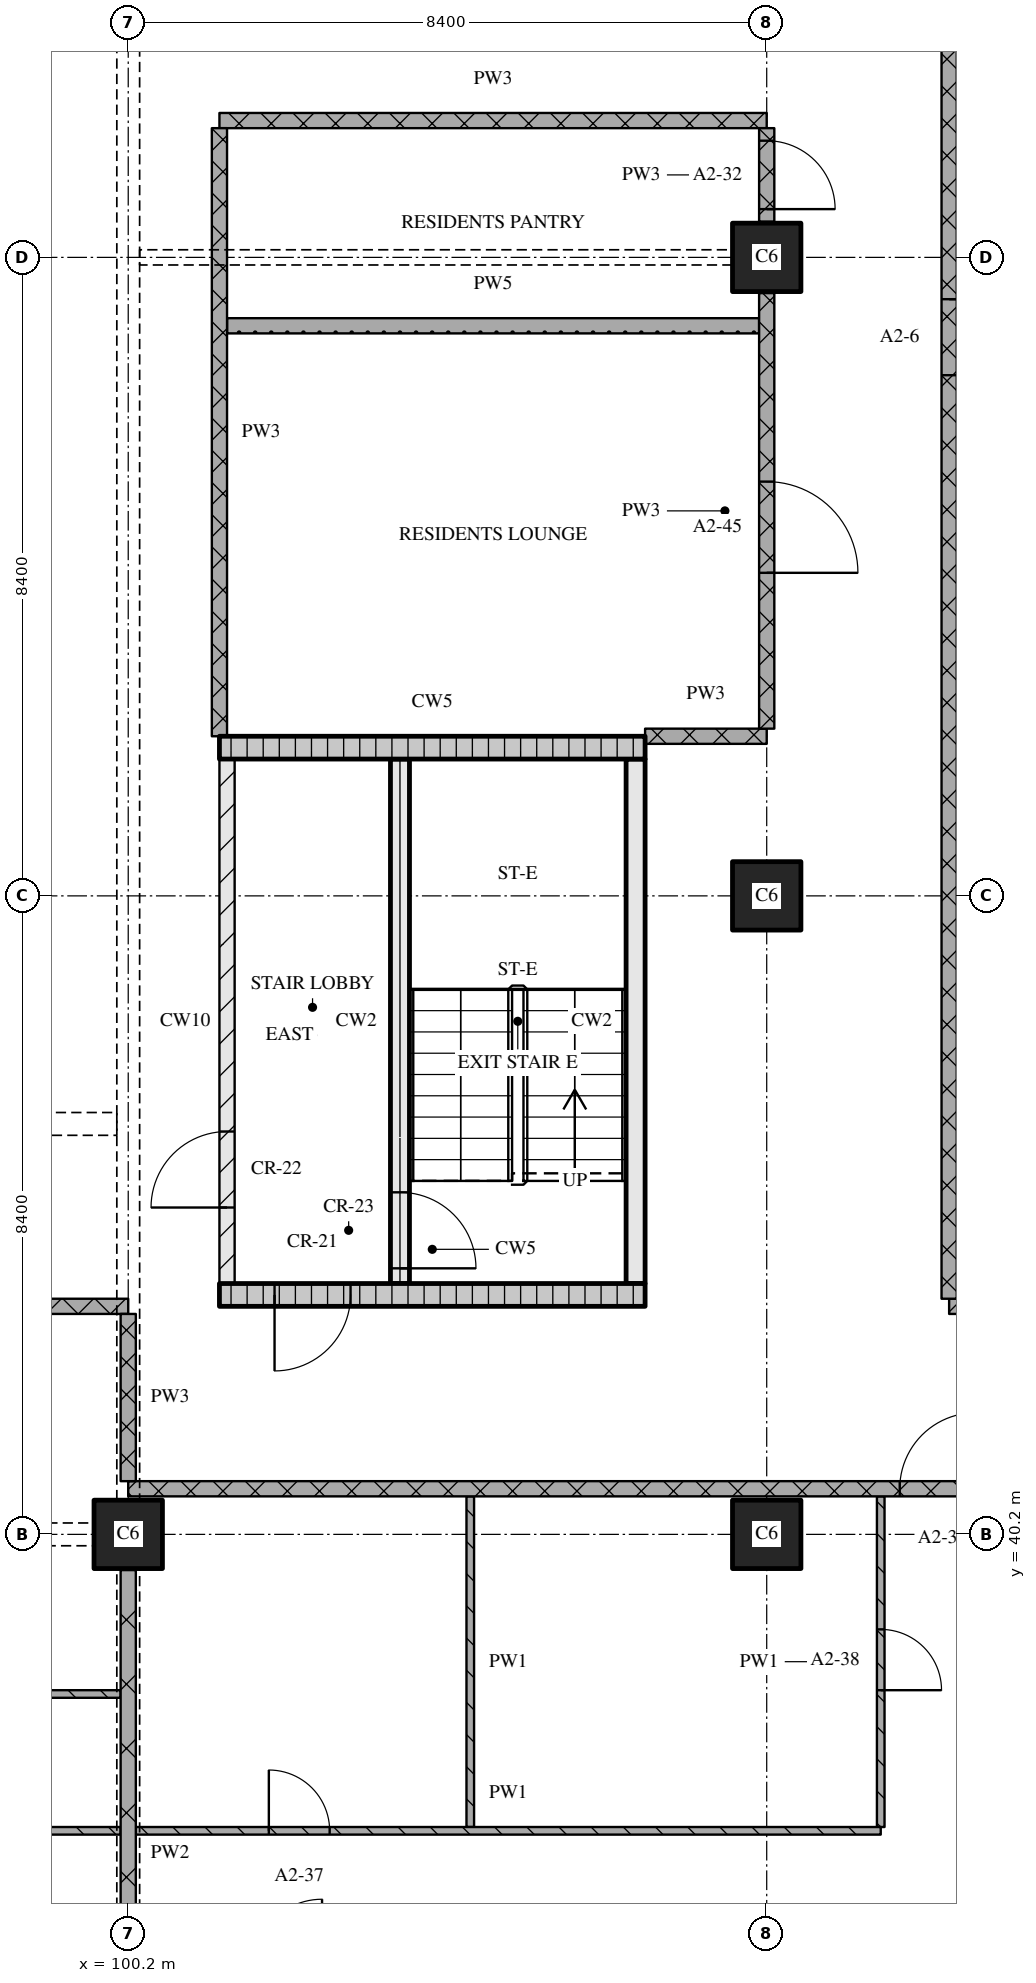
"""IFC4 building model, lengths in metres.
Left out: names, types, materials, properties, quantities, classifications, styles, units other than length and angle.
Written with IfcOpenShell. Run it as: python <this file> out.ifc"""

import sys

from ifc_helpers import new_model, si_unit, direction, frame, frame_2d, origin, origin_2d, place, context, subcontext, project, spatial, rectangle, extrude, element, fill, save


model = new_model("IFC4")
c1 = context("Model", 3, precision=1e-05, world=origin(), true_north=direction((0.0, 1.0)))
c2 = subcontext(c1, "Body", "Model", "MODEL_VIEW")
j1 = project(units=[si_unit("LENGTHUNIT", "METRE"), si_unit("PLANEANGLEUNIT", "RADIAN")], contexts=[c1])
p1 = place(None, origin())
s1 = spatial("IfcSite", under=j1, at=p1, CompositionType="ELEMENT")
p2 = place(p1, origin())
s2 = spatial("IfcBuilding", under=s1, at=p2, CompositionType="ELEMENT")
p3 = place(p2, frame((0.0, 0.0, 48.0)))
s3 = spatial("IfcBuildingStorey", under=s2, at=p3, CompositionType="ELEMENT", Elevation=48.0)
for number, where, z_axis, x_axis in (
    (1, (100.2, 40.2, 0.0), (0.0, 0.0, 1.0), (1.0, 0.0, 0.0)),
    (2, (108.6, 40.2, 0.0), (0.0, 0.0, 1.0), (1.0, 0.0, 0.0)),
    (3, (108.6, 48.6, 0.0), (0.0, 0.0, 1.0), (1.0, 0.0, 0.0)),
    (4, (108.6, 57.0, 0.0), (0.0, 0.0, 1.0), (1.0, 0.0, 0.0)),
):
    element("IfcColumn", number, at=place(p3, frame(where, z_axis=z_axis, x_axis=x_axis)), inside=s3, PredefinedType="COLUMN", context=c2, shape_type="SweptSolid", body=[
        extrude(rectangle(XDim=0.9, YDim=0.9, at=origin_2d()), origin(), (0.0, 0.0, 1.0), 3.6),
    ])
p4 = place(p3, frame((101.4, 43.35, 0.0), z_axis=(0.0, 0.0, 1.0), x_axis=(1.0, 0.0, 0.0)))
e5 = element("IfcWall", 5, at=p4, inside=s3, PredefinedType="SOLIDWALL", context=c2, shape_type="SweptSolid", body=[
    extrude(rectangle(XDim=5.6, YDim=0.3, at=frame_2d((2.8, 0.0))), origin(), (0.0, 0.0, 1.0), 3.32),
])
p5 = place(p4, frame((0.725, 0.0, 0.0)))
e6 = element("IfcOpeningElement", 6, at=p5, cuts=e5, PredefinedType="OPENING", context=c2, shape_type="SweptSolid", body=[
    extrude(rectangle(XDim=1.0, YDim=2.1, at=frame_2d((0.5, 1.05))), frame((0.0, 0.16, 0.0), z_axis=(0.0, -1.0, 0.0), x_axis=(1.0, 0.0, 0.0)), (0.0, 0.0, 1.0), 0.32),
])
p6 = place(p3, frame((101.5, 43.5, 0.0), z_axis=(0.0, 0.0, 1.0), x_axis=(0.0, 1.0, 0.0)))
e7 = element("IfcWall", 7, at=p6, inside=s3, PredefinedType="PARTITIONING", context=c2, shape_type="SweptSolid", body=[
    extrude(rectangle(XDim=6.9, YDim=0.2, at=frame_2d((3.45, 0.0))), origin(), (0.0, 0.0, 1.0), 3.32),
])
p7 = place(p6, frame((1.0, 0.0, 0.0)))
e8 = element("IfcOpeningElement", 8, at=p7, cuts=e7, PredefinedType="OPENING", context=c2, shape_type="SweptSolid", body=[
    extrude(rectangle(XDim=1.0, YDim=2.1, at=frame_2d((0.5, 1.05))), frame((0.0, 0.11, 0.0), z_axis=(0.0, -1.0, 0.0), x_axis=(1.0, 0.0, 0.0)), (0.0, 0.0, 1.0), 0.22),
])
p8 = place(p3, frame((103.775, 43.5, 0.0), z_axis=(0.0, 0.0, 1.0), x_axis=(0.0, 1.0, 0.0)))
e9 = element("IfcWall", 9, at=p8, inside=s3, PredefinedType="SOLIDWALL", context=c2, shape_type="SweptSolid", body=[
    extrude(rectangle(XDim=6.9, YDim=0.25, at=frame_2d((3.45, 0.0))), origin(), (0.0, 0.0, 1.0), 3.32),
])
p9 = place(p8, frame((0.2, 0.0, 0.0)))
e10 = element("IfcOpeningElement", 10, at=p9, cuts=e9, PredefinedType="OPENING", context=c2, shape_type="SweptSolid", body=[
    extrude(rectangle(XDim=1.0, YDim=2.1, at=frame_2d((0.5, 1.05))), frame((0.0, 0.135, 0.0), z_axis=(0.0, -1.0, 0.0), x_axis=(1.0, 0.0, 0.0)), (0.0, 0.0, 1.0), 0.27),
])
p10 = place(p3, frame((106.875, 43.5, 0.0), z_axis=(0.0, 0.0, 1.0), x_axis=(0.0, 1.0, 0.0)))
e11 = element("IfcWall", 11, at=p10, inside=s3, PredefinedType="SOLIDWALL", context=c2, shape_type="SweptSolid", body=[
    extrude(rectangle(XDim=6.9, YDim=0.25, at=frame_2d((3.45, 0.0))), origin(), (0.0, 0.0, 1.0), 3.32),
])
p11 = place(p3, frame((101.4, 50.55, 0.0), z_axis=(0.0, 0.0, 1.0), x_axis=(1.0, 0.0, 0.0)))
e12 = element("IfcWall", 12, at=p11, inside=s3, PredefinedType="SOLIDWALL", context=c2, shape_type="SweptSolid", body=[
    extrude(rectangle(XDim=5.6, YDim=0.3, at=frame_2d((2.8, 0.0))), origin(), (0.0, 0.0, 1.0), 3.32),
])
p12 = place(p3, frame((92.4, 38.1, 0.0), z_axis=(0.0, 0.0, 1.0), x_axis=(1.0, 0.0, 0.0)))
e13 = element("IfcWall", 13, at=p12, inside=s3, PredefinedType="PARTITIONING", context=c2, shape_type="SweptSolid", body=[
    extrude(rectangle(XDim=7.7, YDim=0.1, at=frame_2d((3.85, 0.0))), origin(), (0.0, 0.0, 1.0), 3.32),
])
p13 = place(p12, frame((5.75, 0.0, 0.0)))
e14 = element("IfcOpeningElement", 14, at=p13, cuts=e13, PredefinedType="OPENING", context=c2, shape_type="SweptSolid", body=[
    extrude(rectangle(XDim=0.8, YDim=2.1, at=frame_2d((0.4, 1.05))), frame((0.0, 0.06, 0.0), z_axis=(0.0, -1.0, 0.0), x_axis=(1.0, 0.0, 0.0)), (0.0, 0.0, 1.0), 0.12),
])
p14 = place(p3, frame((124.28, 40.8, 0.0), z_axis=(0.0, 0.0, 1.0), x_axis=(-1.0, 0.0, 0.0)))
e15 = element("IfcWall", 15, at=p14, inside=s3, PredefinedType="PARTITIONING", context=c2, shape_type="SweptSolid", body=[
    extrude(rectangle(XDim=24.08, YDim=0.2, at=frame_2d((12.04, 0.0))), origin(), (0.0, 0.0, 1.0), 3.32),
])
p15 = place(p14, frame((12.93, 0.0, 0.0)))
e16 = element("IfcOpeningElement", 16, at=p15, cuts=e15, PredefinedType="OPENING", context=c2, shape_type="SweptSolid", body=[
    extrude(rectangle(XDim=1.0, YDim=2.1, at=frame_2d((0.5, 1.05))), frame((0.0, 0.11, 0.0), z_axis=(0.0, -1.0, 0.0), x_axis=(1.0, 0.0, 0.0)), (0.0, 0.0, 1.0), 0.22),
])
p16 = place(p3, frame((100.2, 43.2, 0.0), z_axis=(0.0, 0.0, 1.0), x_axis=(-1.0, 0.0, 0.0)))
e17 = element("IfcWall", 17, at=p16, inside=s3, PredefinedType="PARTITIONING", context=c2, shape_type="SweptSolid", body=[
    extrude(rectangle(XDim=25.2, YDim=0.2, at=frame_2d((12.6, 0.0))), origin(), (0.0, 0.0, 1.0), 3.32),
])
p17 = place(p16, frame((8.05, 0.0, 0.0)))
e18 = element("IfcOpeningElement", 18, at=p17, cuts=e17, PredefinedType="OPENING", context=c2, shape_type="SweptSolid", body=[
    extrude(rectangle(XDim=1.0, YDim=2.1, at=frame_2d((0.5, 1.05))), frame((0.0, 0.11, 0.0), z_axis=(0.0, -1.0, 0.0), x_axis=(1.0, 0.0, 0.0)), (0.0, 0.0, 1.0), 0.22),
])
p18 = place(p3, frame((111.0, 43.2, 0.0), z_axis=(0.0, 0.0, 1.0), x_axis=(1.0, 0.0, 0.0)))
e19 = element("IfcWall", 19, at=p18, inside=s3, PredefinedType="PARTITIONING", context=c2, shape_type="SweptSolid", body=[
    extrude(rectangle(XDim=15.92, YDim=0.2, at=frame_2d((7.96, 0.0))), origin(), (0.0, 0.0, 1.0), 3.32),
])
p19 = place(p3, frame((107.0, 50.7, 0.0), z_axis=(0.0, 0.0, 1.0), x_axis=(1.0, 0.0, 0.0)))
e20 = element("IfcWall", 20, at=p19, inside=s3, PredefinedType="PARTITIONING", context=c2, shape_type="SweptSolid", body=[
    extrude(rectangle(XDim=1.6, YDim=0.2, at=frame_2d((0.8, 0.0))), origin(), (0.0, 0.0, 1.0), 3.32),
])
p20 = place(p3, frame((101.5, 56.1, 0.0), z_axis=(0.0, 0.0, 1.0), x_axis=(1.0, 0.0, 0.0)))
e21 = element("IfcWall", 21, at=p20, inside=s3, PredefinedType="PARTITIONING", context=c2, shape_type="SweptSolid", body=[
    extrude(rectangle(XDim=7.0, YDim=0.2, at=frame_2d((3.5, 0.0))), origin(), (0.0, 0.0, 1.0), 3.32),
])
p21 = place(p3, frame((111.1, 56.7, 0.0), z_axis=(0.0, 0.0, 1.0), x_axis=(1.0, 0.0, 0.0)))
e22 = element("IfcWall", 22, at=p21, inside=s3, PredefinedType="PARTITIONING", context=c2, shape_type="SweptSolid", body=[
    extrude(rectangle(XDim=5.43, YDim=0.1, at=frame_2d((2.715, 0.0))), origin(), (0.0, 0.0, 1.0), 3.32),
])
p22 = place(p21, frame((4.45, 0.0, 0.0)))
e23 = element("IfcOpeningElement", 23, at=p22, cuts=e22, PredefinedType="OPENING", context=c2, shape_type="SweptSolid", body=[
    extrude(rectangle(XDim=0.8, YDim=2.1, at=frame_2d((0.4, 1.05))), frame((0.0, 0.06, 0.0), z_axis=(0.0, -1.0, 0.0), x_axis=(1.0, 0.0, 0.0)), (0.0, 0.0, 1.0), 0.12),
])
p23 = place(p3, frame((101.4, 58.8, 0.0), z_axis=(0.0, 0.0, 1.0), x_axis=(1.0, 0.0, 0.0)))
e24 = element("IfcWall", 24, at=p23, inside=s3, PredefinedType="PARTITIONING", context=c2, shape_type="SweptSolid", body=[
    extrude(rectangle(XDim=7.2, YDim=0.2, at=frame_2d((3.6, 0.0))), origin(), (0.0, 0.0, 1.0), 3.32),
])
p24 = place(p3, frame((100.2, 43.1, 0.0), z_axis=(0.0, 0.0, 1.0), x_axis=(0.0, -1.0, 0.0)))
e25 = element("IfcWall", 25, at=p24, inside=s3, PredefinedType="PARTITIONING", context=c2, shape_type="SweptSolid", body=[
    extrude(rectangle(XDim=2.2, YDim=0.2, at=frame_2d((1.1, 0.0))), origin(), (0.0, 0.0, 1.0), 2.43),
])
p25 = place(p3, frame((100.2, 39.73, 0.0), z_axis=(0.0, 0.0, 1.0), x_axis=(0.0, -1.0, 0.0)))
e26 = element("IfcWall", 26, at=p25, inside=s3, PredefinedType="PARTITIONING", context=c2, shape_type="SweptSolid", body=[
    extrude(rectangle(XDim=7.46, YDim=0.2, at=frame_2d((3.73, 0.0))), origin(), (0.0, 0.0, 1.0), 2.83),
])
p26 = place(p3, frame((101.4, 58.7, 0.0), z_axis=(0.0, 0.0, 1.0), x_axis=(0.0, -1.0, 0.0)))
e27 = element("IfcWall", 27, at=p26, inside=s3, PredefinedType="PARTITIONING", context=c2, shape_type="SweptSolid", body=[
    extrude(rectangle(XDim=8.0, YDim=0.2, at=frame_2d((4.0, 0.0))), origin(), (0.0, 0.0, 1.0), 3.32),
])
p27 = place(p3, frame((104.7, 40.7, 0.0), z_axis=(0.0, 0.0, 1.0), x_axis=(0.0, -1.0, 0.0)))
e28 = element("IfcWall", 28, at=p27, inside=s3, PredefinedType="PARTITIONING", context=c2, shape_type="SweptSolid", body=[
    extrude(rectangle(XDim=4.35, YDim=0.1, at=frame_2d((2.175, 0.0))), origin(), (0.0, 0.0, 1.0), 3.32),
])
p28 = place(p3, frame((108.6, 50.8, 0.0), z_axis=(0.0, 0.0, 1.0), x_axis=(0.0, 1.0, 0.0)))
e29 = element("IfcWall", 29, at=p28, inside=s3, PredefinedType="PARTITIONING", context=c2, shape_type="SweptSolid", body=[
    extrude(rectangle(XDim=5.73, YDim=0.2, at=frame_2d((2.865, 0.0))), origin(), (0.0, 0.0, 1.0), 3.32),
])
p29 = place(p28, frame((2.05, 0.0, 0.0)))
e30 = element("IfcOpeningElement", 30, at=p29, cuts=e29, PredefinedType="OPENING", context=c2, shape_type="SweptSolid", body=[
    extrude(rectangle(XDim=1.2, YDim=2.1, at=frame_2d((0.6, 1.05))), frame((0.0, 0.11, 0.0), z_axis=(0.0, -1.0, 0.0), x_axis=(1.0, 0.0, 0.0)), (0.0, 0.0, 1.0), 0.22),
])
p30 = place(p3, frame((108.6, 57.47, 0.0), z_axis=(0.0, 0.0, 1.0), x_axis=(0.0, 1.0, 0.0)))
e31 = element("IfcWall", 31, at=p30, inside=s3, PredefinedType="PARTITIONING", context=c2, shape_type="SweptSolid", body=[
    extrude(rectangle(XDim=1.23, YDim=0.2, at=frame_2d((0.615, 0.0))), origin(), (0.0, 0.0, 1.0), 3.32),
])
p31 = place(p30, frame((0.165, 0.0, 0.0)))
e32 = element("IfcOpeningElement", 32, at=p31, cuts=e31, PredefinedType="OPENING", context=c2, shape_type="SweptSolid", body=[
    extrude(rectangle(XDim=0.9, YDim=2.1, at=frame_2d((0.45, 1.05))), frame((0.0, 0.11, 0.0), z_axis=(0.0, -1.0, 0.0), x_axis=(1.0, 0.0, 0.0)), (0.0, 0.0, 1.0), 0.22),
])
p32 = place(p3, frame((110.1, 36.35, 0.0), z_axis=(0.0, 0.0, 1.0), x_axis=(0.0, 1.0, 0.0)))
e33 = element("IfcWall", 33, at=p32, inside=s3, PredefinedType="PARTITIONING", context=c2, shape_type="SweptSolid", body=[
    extrude(rectangle(XDim=4.35, YDim=0.1, at=frame_2d((2.175, 0.0))), origin(), (0.0, 0.0, 1.0), 3.32),
])
p33 = place(p32, frame((1.8, 0.0, 0.0)))
e34 = element("IfcOpeningElement", 34, at=p33, cuts=e33, PredefinedType="OPENING", context=c2, shape_type="SweptSolid", body=[
    extrude(rectangle(XDim=0.8, YDim=2.1, at=frame_2d((0.4, 1.05))), frame((0.0, 0.06, 0.0), z_axis=(0.0, -1.0, 0.0), x_axis=(1.0, 0.0, 0.0)), (0.0, 0.0, 1.0), 0.12),
])
p34 = place(p3, frame((111.0, 75.32, 0.0), z_axis=(0.0, 0.0, 1.0), x_axis=(0.0, -1.0, 0.0)))
e35 = element("IfcWall", 35, at=p34, inside=s3, PredefinedType="PARTITIONING", context=c2, shape_type="SweptSolid", body=[
    extrude(rectangle(XDim=32.02, YDim=0.2, at=frame_2d((16.01, 0.0))), origin(), (0.0, 0.0, 1.0), 3.32),
])
p35 = place(p34, frame((4.47, 0.0, 0.0)))
e36 = element("IfcOpeningElement", 36, at=p35, cuts=e35, PredefinedType="OPENING", context=c2, shape_type="SweptSolid", body=[
    extrude(rectangle(XDim=1.0, YDim=2.1, at=frame_2d((0.5, 1.05))), frame((0.0, 0.11, 0.0), z_axis=(0.0, -1.0, 0.0), x_axis=(1.0, 0.0, 0.0)), (0.0, 0.0, 1.0), 0.22),
])
p36 = place(p34, frame((18.87, 0.0, 0.0)))
e37 = element("IfcOpeningElement", 37, at=p36, cuts=e35, PredefinedType="OPENING", context=c2, shape_type="SweptSolid", body=[
    extrude(rectangle(XDim=1.0, YDim=2.1, at=frame_2d((0.5, 1.05))), frame((0.0, 0.11, 0.0), z_axis=(0.0, -1.0, 0.0), x_axis=(1.0, 0.0, 0.0)), (0.0, 0.0, 1.0), 0.22),
])
p37 = place(p3, frame((100.1, 36.3, 0.0), z_axis=(0.0, 0.0, 1.0), x_axis=(-1.0, 0.0, 0.0)))
e38 = element("IfcWall", 38, at=p37, inside=s3, PredefinedType="PARTITIONING", context=c2, shape_type="SweptSolid", body=[
    extrude(rectangle(XDim=12.5, YDim=0.1, at=frame_2d((6.25, 0.0))), origin(), (0.0, 0.0, 1.0), 3.32),
])
p38 = place(p37, frame((1.55, 0.0, 0.0)))
e39 = element("IfcOpeningElement", 39, at=p38, cuts=e38, PredefinedType="OPENING", context=c2, shape_type="SweptSolid", body=[
    extrude(rectangle(XDim=0.9, YDim=2.1, at=frame_2d((0.45, 1.05))), frame((0.0, 0.06, 0.0), z_axis=(0.0, -1.0, 0.0), x_axis=(1.0, 0.0, 0.0)), (0.0, 0.0, 1.0), 0.12),
])
p39 = place(p37, frame((7.85, 0.0, 0.0)))
e40 = element("IfcOpeningElement", 40, at=p39, cuts=e38, PredefinedType="OPENING", context=c2, shape_type="SweptSolid", body=[
    extrude(rectangle(XDim=0.9, YDim=2.1, at=frame_2d((0.45, 1.05))), frame((0.0, 0.06, 0.0), z_axis=(0.0, -1.0, 0.0), x_axis=(1.0, 0.0, 0.0)), (0.0, 0.0, 1.0), 0.12),
])
p40 = place(p3, frame((100.3, 36.3, 0.0), z_axis=(0.0, 0.0, 1.0), x_axis=(1.0, 0.0, 0.0)))
e41 = element("IfcWall", 41, at=p40, inside=s3, PredefinedType="PARTITIONING", context=c2, shape_type="SweptSolid", body=[
    extrude(rectangle(XDim=9.8, YDim=0.1, at=frame_2d((4.9, 0.0))), origin(), (0.0, 0.0, 1.0), 3.32),
])
p41 = place(p40, frame((1.75, 0.0, 0.0)))
e42 = element("IfcOpeningElement", 42, at=p41, cuts=e41, PredefinedType="OPENING", context=c2, shape_type="SweptSolid", body=[
    extrude(rectangle(XDim=0.8, YDim=2.1, at=frame_2d((0.4, 1.05))), frame((0.0, 0.06, 0.0), z_axis=(0.0, -1.0, 0.0), x_axis=(1.0, 0.0, 0.0)), (0.0, 0.0, 1.0), 0.12),
])
p42 = place(p5, origin())
e43 = element("IfcDoor", 43, at=p42, inside=s3, OperationType="SINGLE_SWING_RIGHT", PredefinedType="DOOR", context=c2, shape_type="SweptSolid", body=[
    extrude(rectangle(XDim=1.0, YDim=2.1, at=frame_2d((0.5, 1.05))), frame((0.0, 0.025, 0.0), z_axis=(0.0, -1.0, 0.0), x_axis=(1.0, 0.0, 0.0)), (0.0, 0.0, 1.0), 0.05),
])
fill(e6, e43)
p43 = place(p9, origin())
e44 = element("IfcDoor", 44, at=p43, inside=s3, OperationType="SINGLE_SWING_RIGHT", PredefinedType="DOOR", context=c2, shape_type="SweptSolid", body=[
    extrude(rectangle(XDim=1.0, YDim=2.1, at=frame_2d((0.5, 1.05))), frame((0.0, 0.025, 0.0), z_axis=(0.0, -1.0, 0.0), x_axis=(1.0, 0.0, 0.0)), (0.0, 0.0, 1.0), 0.05),
])
fill(e10, e44)
p44 = place(p7, origin())
e45 = element("IfcDoor", 45, at=p44, inside=s3, OperationType="SINGLE_SWING_LEFT", PredefinedType="DOOR", context=c2, shape_type="SweptSolid", body=[
    extrude(rectangle(XDim=1.0, YDim=2.1, at=frame_2d((0.5, 1.05))), frame((0.0, 0.025, 0.0), z_axis=(0.0, -1.0, 0.0), x_axis=(1.0, 0.0, 0.0)), (0.0, 0.0, 1.0), 0.05),
])
fill(e8, e45)
p45 = place(p15, origin())
e46 = element("IfcDoor", 46, at=p45, inside=s3, OperationType="SINGLE_SWING_RIGHT", PredefinedType="DOOR", context=c2, shape_type="SweptSolid", body=[
    extrude(rectangle(XDim=1.0, YDim=2.1, at=frame_2d((0.5, 1.05))), frame((0.0, 0.025, 0.0), z_axis=(0.0, -1.0, 0.0), x_axis=(1.0, 0.0, 0.0)), (0.0, 0.0, 1.0), 0.05),
])
fill(e16, e46)
p46 = place(p29, origin())
e47 = element("IfcDoor", 47, at=p46, inside=s3, OperationType="SINGLE_SWING_RIGHT", PredefinedType="DOOR", context=c2, shape_type="SweptSolid", body=[
    extrude(rectangle(XDim=1.2, YDim=2.1, at=frame_2d((0.6, 1.05))), frame((0.0, 0.025, 0.0), z_axis=(0.0, -1.0, 0.0), x_axis=(1.0, 0.0, 0.0)), (0.0, 0.0, 1.0), 0.05),
])
fill(e30, e47)
p47 = place(p31, origin())
e48 = element("IfcDoor", 48, at=p47, inside=s3, OperationType="SINGLE_SWING_RIGHT", PredefinedType="DOOR", context=c2, shape_type="SweptSolid", body=[
    extrude(rectangle(XDim=0.9, YDim=2.1, at=frame_2d((0.45, 1.05))), frame((0.0, 0.025, 0.0), z_axis=(0.0, -1.0, 0.0), x_axis=(1.0, 0.0, 0.0)), (0.0, 0.0, 1.0), 0.05),
])
fill(e32, e48)
p48 = place(p33, origin())
e49 = element("IfcDoor", 49, at=p48, inside=s3, OperationType="SINGLE_SWING_RIGHT", PredefinedType="DOOR", context=c2, shape_type="SweptSolid", body=[
    extrude(rectangle(XDim=0.8, YDim=2.1, at=frame_2d((0.4, 1.05))), frame((0.0, 0.025, 0.0), z_axis=(0.0, -1.0, 0.0), x_axis=(1.0, 0.0, 0.0)), (0.0, 0.0, 1.0), 0.05),
])
fill(e34, e49)
p49 = place(p36, origin())
e50 = element("IfcDoor", 50, at=p49, inside=s3, OperationType="SINGLE_SWING_LEFT", PredefinedType="DOOR", context=c2, shape_type="SweptSolid", body=[
    extrude(rectangle(XDim=1.0, YDim=2.1, at=frame_2d((0.5, 1.05))), frame((0.0, 0.025, 0.0), z_axis=(0.0, -1.0, 0.0), x_axis=(1.0, 0.0, 0.0)), (0.0, 0.0, 1.0), 0.05),
])
fill(e37, e50)
p50 = place(p41, origin())
e51 = element("IfcDoor", 51, at=p50, inside=s3, OperationType="SINGLE_SWING_LEFT", PredefinedType="DOOR", context=c2, shape_type="SweptSolid", body=[
    extrude(rectangle(XDim=0.8, YDim=2.1, at=frame_2d((0.4, 1.05))), frame((0.0, 0.025, 0.0), z_axis=(0.0, -1.0, 0.0), x_axis=(1.0, 0.0, 0.0)), (0.0, 0.0, 1.0), 0.05),
])
fill(e42, e51)
save(model, sys.argv[1])
